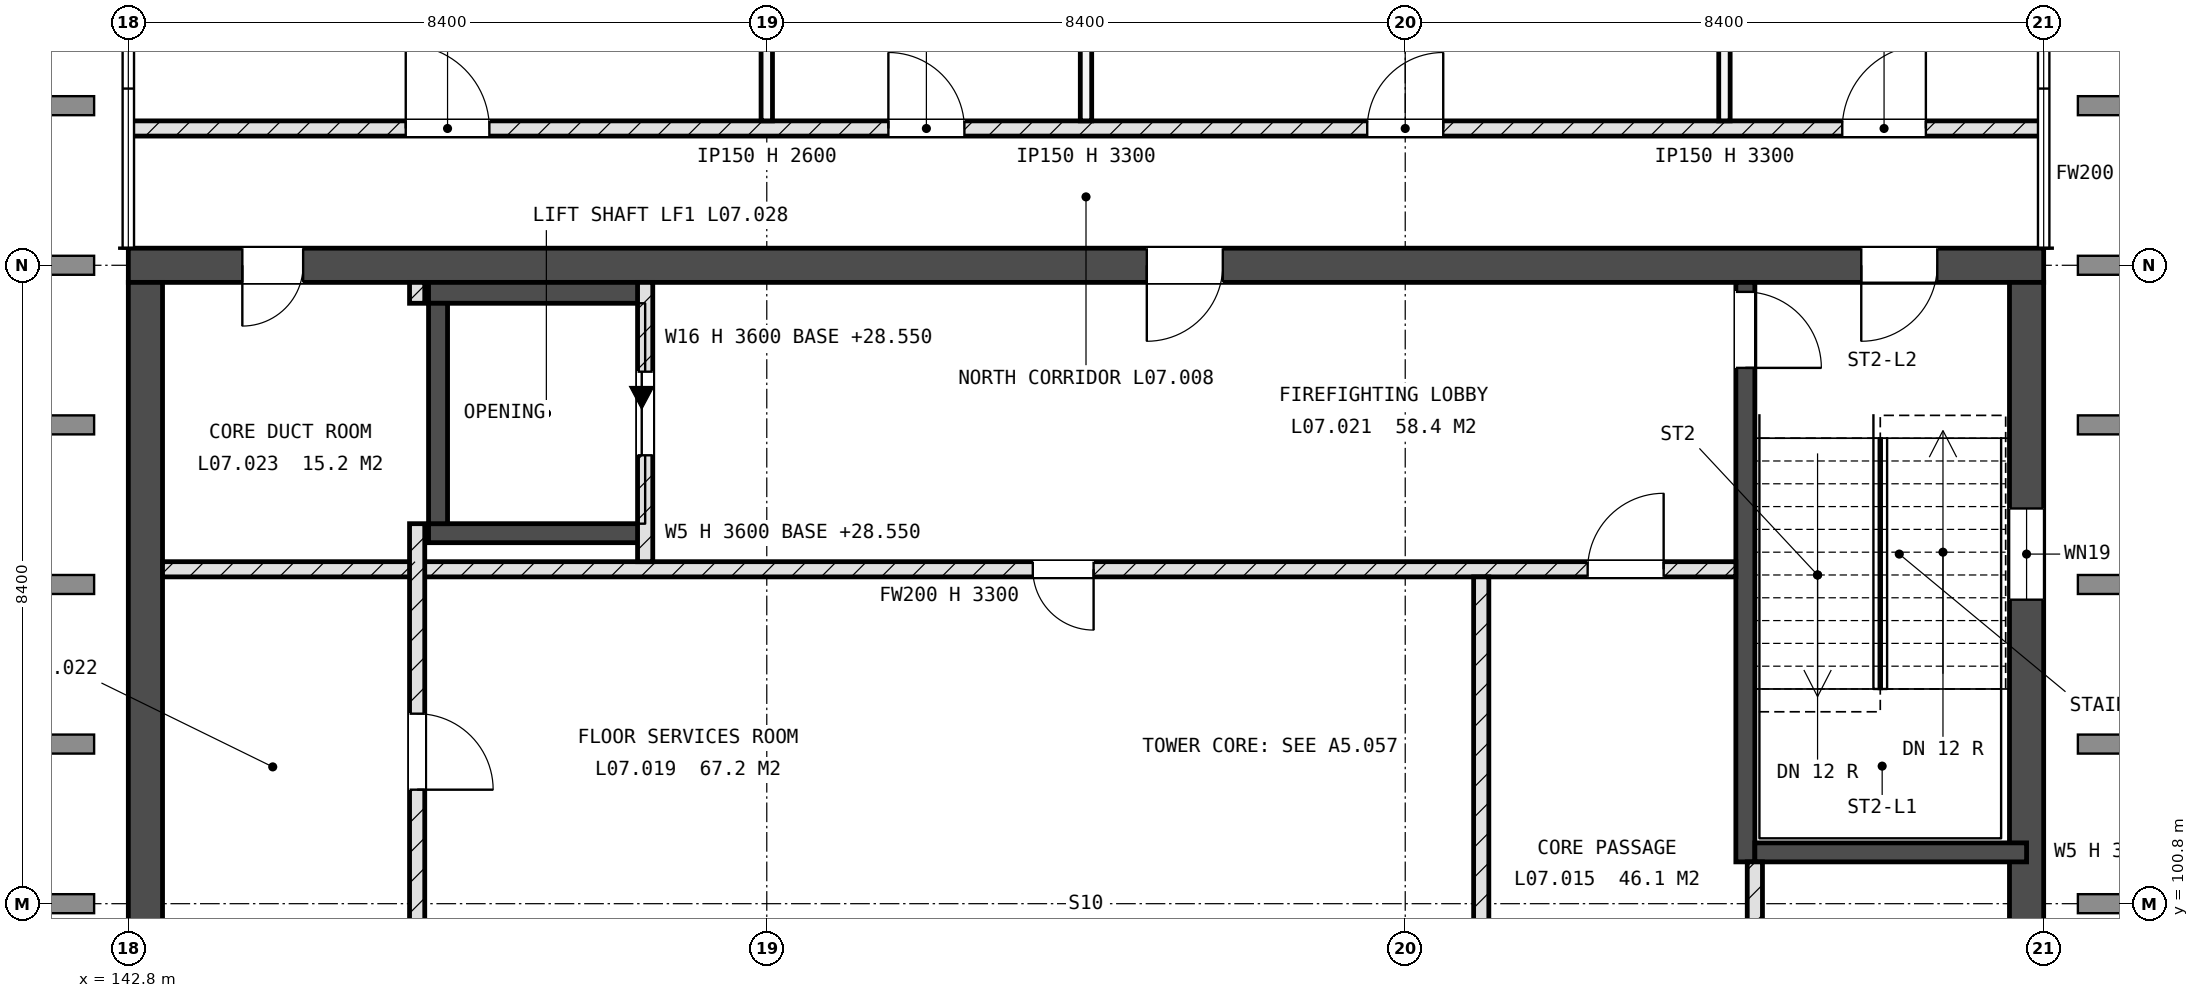
"""IFC4 building model, lengths in metres.
Left out: names, types, materials, properties, quantities, classifications, styles, units other than length and angle.
Written with IfcOpenShell. Run it as: python <this file> out.ifc"""

import sys

from ifc_helpers import new_model, si_unit, direction, frame, frame_2d, origin, place, context, subcontext, project, spatial, rectangle, extrude, element, fill, save


model = new_model("IFC4")
c1 = context("Model", 3, precision=1e-05, world=origin(), true_north=direction((0.0, 1.0)))
c2 = subcontext(c1, "Body", "Model", "MODEL_VIEW")
j1 = project(units=[si_unit("LENGTHUNIT", "METRE"), si_unit("PLANEANGLEUNIT", "RADIAN")], contexts=[c1])
p1 = place(None, origin())
s1 = spatial("IfcSite", under=j1, at=p1, CompositionType="ELEMENT")
p2 = place(p1, origin())
s2 = spatial("IfcBuilding", under=s1, at=p2, CompositionType="ELEMENT")
p3 = place(p2, frame((0.0, 0.0, 28.8)))
s3 = spatial("IfcBuildingStorey", under=s2, at=p3, CompositionType="ELEMENT", Elevation=28.8)
p4 = place(p3, frame((142.8, 109.2, -0.25), z_axis=(0.0, 0.0, 1.0), x_axis=(1.0, 0.0, 0.0)))
e1 = element("IfcWall", 1, at=p4, inside=s3, PredefinedType="SHEAR", context=c2, shape_type="SweptSolid", body=[
    extrude(rectangle(XDim=25.2, YDim=0.45, at=frame_2d((12.6, 0.0))), origin(), (0.0, 0.0, 1.0), 3.6),
])
p5 = place(p4, frame((22.8, 0.0, 0.25)))
e2 = element("IfcOpeningElement", 2, at=p5, cuts=e1, PredefinedType="OPENING", context=c2, shape_type="SweptSolid", body=[
    extrude(rectangle(XDim=1.0, YDim=2.1, at=frame_2d((0.5, 1.05))), frame((0.0, 0.235, 0.0), z_axis=(0.0, -1.0, 0.0), x_axis=(1.0, 0.0, 0.0)), (0.0, 0.0, 1.0), 0.47),
])
p6 = place(p4, frame((1.5, 0.0, 0.25)))
e3 = element("IfcOpeningElement", 3, at=p6, cuts=e1, PredefinedType="OPENING", context=c2, shape_type="SweptSolid", body=[
    extrude(rectangle(XDim=0.8, YDim=2.1, at=frame_2d((0.4, 1.05))), frame((0.0, 0.235, 0.0), z_axis=(0.0, -1.0, 0.0), x_axis=(1.0, 0.0, 0.0)), (0.0, 0.0, 1.0), 0.47),
])
p7 = place(p4, frame((13.4, 0.0, 0.25)))
e4 = element("IfcOpeningElement", 4, at=p7, cuts=e1, PredefinedType="OPENING", context=c2, shape_type="SweptSolid", body=[
    extrude(rectangle(XDim=1.0, YDim=2.1, at=frame_2d((0.5, 1.05))), frame((0.0, 0.235, 0.0), z_axis=(0.0, -1.0, 0.0), x_axis=(1.0, 0.0, 0.0)), (0.0, 0.0, 1.0), 0.47),
])
p8 = place(p3, frame((143.025, 92.625, -0.25), z_axis=(0.0, 0.0, 1.0), x_axis=(0.0, 1.0, 0.0)))
e5 = element("IfcWall", 5, at=p8, inside=s3, PredefinedType="SHEAR", context=c2, shape_type="SweptSolid", body=[
    extrude(rectangle(XDim=16.35, YDim=0.45, at=frame_2d((8.175, 0.0))), origin(), (0.0, 0.0, 1.0), 3.6),
])
p9 = place(p8, frame((2.975, 0.0, 1.85)))
e6 = element("IfcOpeningElement", 6, at=p9, cuts=e5, PredefinedType="OPENING", context=c2, shape_type="SweptSolid", body=[
    extrude(rectangle(XDim=1.2, YDim=0.9, at=frame_2d((0.6, 0.45))), frame((0.0, 0.235, 0.0), z_axis=(0.0, -1.0, 0.0), x_axis=(1.0, 0.0, 0.0)), (0.0, 0.0, 1.0), 0.47),
])
p10 = place(p3, frame((167.775, 92.625, -0.25), z_axis=(0.0, 0.0, 1.0), x_axis=(0.0, 1.0, 0.0)))
e7 = element("IfcWall", 7, at=p10, inside=s3, PredefinedType="SHEAR", context=c2, shape_type="SweptSolid", body=[
    extrude(rectangle(XDim=16.35, YDim=0.45, at=frame_2d((8.175, 0.0))), origin(), (0.0, 0.0, 1.0), 3.6),
])
p11 = place(p10, frame((12.175, 0.0, 1.85)))
e8 = element("IfcOpeningElement", 8, at=p11, cuts=e7, PredefinedType="OPENING", context=c2, shape_type="SweptSolid", body=[
    extrude(rectangle(XDim=1.2, YDim=0.9, at=frame_2d((0.6, 0.45))), frame((0.0, 0.235, 0.0), z_axis=(0.0, -1.0, 0.0), x_axis=(1.0, 0.0, 0.0)), (0.0, 0.0, 1.0), 0.47),
])
p12 = place(p3, frame((164.075, 101.35, -0.25), z_axis=(0.0, 0.0, 1.0), x_axis=(0.0, 1.0, 0.0)))
e9 = element("IfcWall", 9, at=p12, inside=s3, PredefinedType="SHEAR", context=c2, shape_type="SweptSolid", body=[
    extrude(rectangle(XDim=7.625, YDim=0.25, at=frame_2d((3.812, 0.0))), origin(), (0.0, 0.0, 1.0), 3.6),
])
p13 = place(p12, frame((6.5, 0.0, 0.25)))
e10 = element("IfcOpeningElement", 10, at=p13, cuts=e9, PredefinedType="OPENING", context=c2, shape_type="SweptSolid", body=[
    extrude(rectangle(XDim=1.0, YDim=2.1, at=frame_2d((0.5, 1.05))), frame((0.0, 0.135, 0.0), z_axis=(0.0, -1.0, 0.0), x_axis=(1.0, 0.0, 0.0)), (0.0, 0.0, 1.0), 0.27),
])
p14 = place(p3, frame((164.2, 101.475, -0.25), z_axis=(0.0, 0.0, 1.0), x_axis=(1.0, 0.0, 0.0)))
e11 = element("IfcWall", 11, at=p14, inside=s3, PredefinedType="SHEAR", context=c2, shape_type="SweptSolid", body=[
    extrude(rectangle(XDim=3.575, YDim=0.25, at=frame_2d((1.788, 0.0))), origin(), (0.0, 0.0, 1.0), 3.6),
])
p15 = place(p3, frame((146.75, 105.675, -0.25), z_axis=(0.0, 0.0, 1.0), x_axis=(1.0, 0.0, 0.0)))
e12 = element("IfcWall", 12, at=p15, inside=s3, PredefinedType="SHEAR", context=c2, shape_type="SweptSolid", body=[
    extrude(rectangle(XDim=2.85, YDim=0.25, at=frame_2d((1.425, 0.0))), origin(), (0.0, 0.0, 1.0), 3.6),
])
p16 = place(p3, frame((146.75, 108.837, -0.25), z_axis=(0.0, 0.0, 1.0), x_axis=(1.0, 0.0, 0.0)))
e13 = element("IfcWall", 13, at=p16, inside=s3, PredefinedType="SHEAR", context=c2, shape_type="SweptSolid", body=[
    extrude(rectangle(XDim=2.85, YDim=0.275, at=frame_2d((1.425, 0.0))), origin(), (0.0, 0.0, 1.0), 3.6),
])
p17 = place(p3, frame((146.875, 105.8, -0.25), z_axis=(0.0, 0.0, 1.0), x_axis=(0.0, 1.0, 0.0)))
e14 = element("IfcWall", 14, at=p17, inside=s3, PredefinedType="SHEAR", context=c2, shape_type="SweptSolid", body=[
    extrude(rectangle(XDim=2.9, YDim=0.25, at=frame_2d((1.45, 0.0))), origin(), (0.0, 0.0, 1.0), 3.6),
])
p18 = place(p3, frame((143.25, 105.2, 0.0), z_axis=(0.0, 0.0, 1.0), x_axis=(1.0, 0.0, 0.0)))
e15 = element("IfcWall", 15, at=p18, inside=s3, PredefinedType="SOLIDWALL", context=c2, shape_type="SweptSolid", body=[
    extrude(rectangle(XDim=20.7, YDim=0.2, at=frame_2d((10.35, 0.0))), origin(), (0.0, 0.0, 1.0), 3.3),
])
p19 = place(p18, frame((11.45, 0.0, 0.0)))
e16 = element("IfcOpeningElement", 16, at=p19, cuts=e15, PredefinedType="OPENING", context=c2, shape_type="SweptSolid", body=[
    extrude(rectangle(XDim=0.8, YDim=2.1, at=frame_2d((0.4, 1.05))), frame((0.0, 0.11, 0.0), z_axis=(0.0, -1.0, 0.0), x_axis=(1.0, 0.0, 0.0)), (0.0, 0.0, 1.0), 0.22),
])
p20 = place(p18, frame((18.75, 0.0, 0.0)))
e17 = element("IfcOpeningElement", 17, at=p20, cuts=e15, PredefinedType="OPENING", context=c2, shape_type="SweptSolid", body=[
    extrude(rectangle(XDim=1.0, YDim=2.1, at=frame_2d((0.5, 1.05))), frame((0.0, 0.11, 0.0), z_axis=(0.0, -1.0, 0.0), x_axis=(1.0, 0.0, 0.0)), (0.0, 0.0, 1.0), 0.22),
])
p21 = place(p3, frame((142.8, 111.0, 0.0), z_axis=(0.0, 0.0, 1.0), x_axis=(1.0, 0.0, 0.0)))
e18 = element("IfcWall", 18, at=p21, inside=s3, PredefinedType="SOLIDWALL", context=c2, shape_type="SweptSolid", body=[
    extrude(rectangle(XDim=25.2, YDim=0.2, at=frame_2d((12.6, 0.0))), origin(), (0.0, 0.0, 1.0), 3.3),
])
p22 = place(p21, frame((3.65, 0.0, 0.0)))
e19 = element("IfcOpeningElement", 19, at=p22, cuts=e18, PredefinedType="OPENING", context=c2, shape_type="SweptSolid", body=[
    extrude(rectangle(XDim=1.1, YDim=2.25, at=frame_2d((0.55, 1.125))), frame((0.0, 0.11, 0.0), z_axis=(0.0, -1.0, 0.0), x_axis=(1.0, 0.0, 0.0)), (0.0, 0.0, 1.0), 0.22),
])
p23 = place(p21, frame((10.0, 0.0, 0.0)))
e20 = element("IfcOpeningElement", 20, at=p23, cuts=e18, PredefinedType="OPENING", context=c2, shape_type="SweptSolid", body=[
    extrude(rectangle(XDim=1.0, YDim=2.1, at=frame_2d((0.5, 1.05))), frame((0.0, 0.11, 0.0), z_axis=(0.0, -1.0, 0.0), x_axis=(1.0, 0.0, 0.0)), (0.0, 0.0, 1.0), 0.22),
])
p24 = place(p21, frame((16.3, 0.0, 0.0)))
e21 = element("IfcOpeningElement", 21, at=p24, cuts=e18, PredefinedType="OPENING", context=c2, shape_type="SweptSolid", body=[
    extrude(rectangle(XDim=1.0, YDim=2.1, at=frame_2d((0.5, 1.05))), frame((0.0, 0.11, 0.0), z_axis=(0.0, -1.0, 0.0), x_axis=(1.0, 0.0, 0.0)), (0.0, 0.0, 1.0), 0.22),
])
p25 = place(p21, frame((22.55, 0.0, 0.0)))
e22 = element("IfcOpeningElement", 22, at=p25, cuts=e18, PredefinedType="OPENING", context=c2, shape_type="SweptSolid", body=[
    extrude(rectangle(XDim=1.1, YDim=2.25, at=frame_2d((0.55, 1.125))), frame((0.0, 0.11, 0.0), z_axis=(0.0, -1.0, 0.0), x_axis=(1.0, 0.0, 0.0)), (0.0, 0.0, 1.0), 0.22),
])
p26 = place(p3, frame((146.6, 100.5, 0.0), z_axis=(0.0, 0.0, 1.0), x_axis=(0.0, 1.0, 0.0)))
e23 = element("IfcWall", 23, at=p26, inside=s3, PredefinedType="SOLIDWALL", context=c2, shape_type="SweptSolid", body=[
    extrude(rectangle(XDim=5.3, YDim=0.2, at=frame_2d((2.65, 0.0))), origin(), (0.0, 0.0, 1.0), 3.3),
])
p27 = place(p26, frame((1.8, 0.0, 0.0)))
e24 = element("IfcOpeningElement", 24, at=p27, cuts=e23, PredefinedType="OPENING", context=c2, shape_type="SweptSolid", body=[
    extrude(rectangle(XDim=1.0, YDim=2.1, at=frame_2d((0.5, 1.05))), frame((0.0, 0.11, 0.0), z_axis=(0.0, -1.0, 0.0), x_axis=(1.0, 0.0, 0.0)), (0.0, 0.0, 1.0), 0.22),
])
p28 = place(p3, frame((146.6, 108.7, 0.0), z_axis=(0.0, 0.0, 1.0), x_axis=(0.0, 1.0, 0.0)))
e25 = element("IfcWall", 25, at=p28, inside=s3, PredefinedType="SOLIDWALL", context=c2, shape_type="SweptSolid", body=[
    extrude(rectangle(XDim=0.275, YDim=0.2, at=frame_2d((0.138, 0.0))), origin(), (0.0, 0.0, 1.0), 3.3),
])
p29 = place(p3, frame((149.6, 105.3, 0.0), z_axis=(0.0, 0.0, 1.0), x_axis=(0.0, 1.0, 0.0)))
e26 = element("IfcWall", 26, at=p29, inside=s3, PredefinedType="SOLIDWALL", context=c2, shape_type="SweptSolid", body=[
    extrude(rectangle(XDim=3.675, YDim=0.2, at=frame_2d((1.837, 0.0))), origin(), (0.0, 0.0, 1.0), 3.3),
])
p30 = place(p29, frame((1.4, 0.0, 0.0)))
e27 = element("IfcOpeningElement", 27, at=p30, cuts=e26, PredefinedType="OPENING", context=c2, shape_type="SweptSolid", body=[
    extrude(rectangle(XDim=1.1, YDim=2.1, at=frame_2d((0.55, 1.05))), frame((0.0, 0.11, 0.0), z_axis=(0.0, -1.0, 0.0), x_axis=(1.0, 0.0, 0.0)), (0.0, 0.0, 1.0), 0.22),
])
p31 = place(p3, frame((151.2, 111.1, 0.0), z_axis=(0.0, 0.0, 1.0), x_axis=(0.0, 1.0, 0.0)))
e28 = element("IfcWall", 28, at=p31, inside=s3, PredefinedType="PARTITIONING", context=c2, shape_type="SweptSolid", body=[
    extrude(rectangle(XDim=6.5, YDim=0.15, at=frame_2d((3.25, 0.0))), origin(), (0.0, 0.0, 1.0), 2.6),
])
p32 = place(p3, frame((155.4, 111.1, 0.0), z_axis=(0.0, 0.0, 1.0), x_axis=(0.0, 1.0, 0.0)))
e29 = element("IfcWall", 29, at=p32, inside=s3, PredefinedType="PARTITIONING", context=c2, shape_type="SweptSolid", body=[
    extrude(rectangle(XDim=6.5, YDim=0.15, at=frame_2d((3.25, 0.0))), origin(), (0.0, 0.0, 1.0), 3.3),
])
p33 = place(p3, frame((160.6, 92.625, 0.0), z_axis=(0.0, 0.0, 1.0), x_axis=(0.0, 1.0, 0.0)))
e30 = element("IfcWall", 30, at=p33, inside=s3, PredefinedType="SOLIDWALL", context=c2, shape_type="SweptSolid", body=[
    extrude(rectangle(XDim=12.475, YDim=0.2, at=frame_2d((6.238, 0.0))), origin(), (0.0, 0.0, 1.0), 3.3),
])
p34 = place(p33, frame((5.075, 0.0, 0.0)))
e31 = element("IfcOpeningElement", 31, at=p34, cuts=e30, PredefinedType="OPENING", context=c2, shape_type="SweptSolid", body=[
    extrude(rectangle(XDim=0.8, YDim=2.1, at=frame_2d((0.4, 1.05))), frame((0.0, 0.11, 0.0), z_axis=(0.0, -1.0, 0.0), x_axis=(1.0, 0.0, 0.0)), (0.0, 0.0, 1.0), 0.22),
])
p35 = place(p33, frame((0.775, 0.0, 0.0)))
e32 = element("IfcOpeningElement", 32, at=p35, cuts=e30, PredefinedType="OPENING", context=c2, shape_type="SweptSolid", body=[
    extrude(rectangle(XDim=1.0, YDim=2.1, at=frame_2d((0.5, 1.05))), frame((0.0, 0.11, 0.0), z_axis=(0.0, -1.0, 0.0), x_axis=(1.0, 0.0, 0.0)), (0.0, 0.0, 1.0), 0.22),
])
p36 = place(p3, frame((163.8, 111.1, 0.0), z_axis=(0.0, 0.0, 1.0), x_axis=(0.0, 1.0, 0.0)))
e33 = element("IfcWall", 33, at=p36, inside=s3, PredefinedType="PARTITIONING", context=c2, shape_type="SweptSolid", body=[
    extrude(rectangle(XDim=6.5, YDim=0.15, at=frame_2d((3.25, 0.0))), origin(), (0.0, 0.0, 1.0), 3.3),
])
p37 = place(p3, frame((164.2, 92.625, 0.0), z_axis=(0.0, 0.0, 1.0), x_axis=(0.0, 1.0, 0.0)))
e34 = element("IfcWall", 34, at=p37, inside=s3, PredefinedType="SOLIDWALL", context=c2, shape_type="SweptSolid", body=[
    extrude(rectangle(XDim=8.725, YDim=0.2, at=frame_2d((4.363, 0.0))), origin(), (0.0, 0.0, 1.0), 3.3),
])
p38 = place(p37, frame((1.675, 0.0, 0.0)))
e35 = element("IfcOpeningElement", 35, at=p38, cuts=e34, PredefinedType="OPENING", context=c2, shape_type="SweptSolid", body=[
    extrude(rectangle(XDim=0.8, YDim=2.1, at=frame_2d((0.4, 1.05))), frame((0.0, 0.11, 0.0), z_axis=(0.0, -1.0, 0.0), x_axis=(1.0, 0.0, 0.0)), (0.0, 0.0, 1.0), 0.22),
])
p39 = place(p37, frame((6.275, 0.0, 0.0)))
e36 = element("IfcOpeningElement", 36, at=p39, cuts=e34, PredefinedType="OPENING", context=c2, shape_type="SweptSolid", body=[
    extrude(rectangle(XDim=0.8, YDim=2.1, at=frame_2d((0.4, 1.05))), frame((0.0, 0.11, 0.0), z_axis=(0.0, -1.0, 0.0), x_axis=(1.0, 0.0, 0.0)), (0.0, 0.0, 1.0), 0.22),
])
p40 = place(p11, origin())
e37 = element("IfcWindow", 37, at=p40, inside=s3, PartitioningType="SINGLE_PANEL", PredefinedType="WINDOW", context=c2, shape_type="SweptSolid", body=[
    extrude(rectangle(XDim=1.2, YDim=0.9, at=frame_2d((0.6, 0.45))), frame((0.0, 0.03, 0.0), z_axis=(0.0, -1.0, 0.0), x_axis=(1.0, 0.0, 0.0)), (0.0, 0.0, 1.0), 0.06),
])
fill(e8, e37)
p41 = place(p30, origin())
e38 = element("IfcDoor", 38, at=p41, inside=s3, OperationType="SLIDING_TO_LEFT", PredefinedType="DOOR", context=c2, shape_type="SweptSolid", body=[
    extrude(rectangle(XDim=1.1, YDim=2.1, at=frame_2d((0.55, 1.05))), frame((0.0, 0.025, 0.0), z_axis=(0.0, -1.0, 0.0), x_axis=(1.0, 0.0, 0.0)), (0.0, 0.0, 1.0), 0.05),
])
fill(e27, e38)
p42 = place(p13, origin())
e39 = element("IfcDoor", 39, at=p42, inside=s3, OperationType="SINGLE_SWING_LEFT", PredefinedType="DOOR", context=c2, shape_type="SweptSolid", body=[
    extrude(rectangle(XDim=1.0, YDim=2.1, at=frame_2d((0.5, 1.05))), frame((0.0, 0.025, 0.0), z_axis=(0.0, -1.0, 0.0), x_axis=(1.0, 0.0, 0.0)), (0.0, 0.0, 1.0), 0.05),
])
fill(e10, e39)
p43 = place(p5, origin())
e40 = element("IfcDoor", 40, at=p43, inside=s3, OperationType="SINGLE_SWING_LEFT", PredefinedType="DOOR", context=c2, shape_type="SweptSolid", body=[
    extrude(rectangle(XDim=1.0, YDim=2.1, at=frame_2d((0.5, 1.05))), frame((0.0, 0.025, 0.0), z_axis=(0.0, -1.0, 0.0), x_axis=(1.0, 0.0, 0.0)), (0.0, 0.0, 1.0), 0.05),
])
fill(e2, e40)
p44 = place(p22, origin())
e41 = element("IfcDoor", 41, at=p44, inside=s3, OperationType="SINGLE_SWING_RIGHT", PredefinedType="DOOR", context=c2, shape_type="SweptSolid", body=[
    extrude(rectangle(XDim=1.1, YDim=2.25, at=frame_2d((0.55, 1.125))), frame((0.0, 0.025, 0.0), z_axis=(0.0, -1.0, 0.0), x_axis=(1.0, 0.0, 0.0)), (0.0, 0.0, 1.0), 0.05),
])
fill(e19, e41)
p45 = place(p23, origin())
e42 = element("IfcDoor", 42, at=p45, inside=s3, OperationType="SINGLE_SWING_RIGHT", PredefinedType="DOOR", context=c2, shape_type="SweptSolid", body=[
    extrude(rectangle(XDim=1.0, YDim=2.1, at=frame_2d((0.5, 1.05))), frame((0.0, 0.025, 0.0), z_axis=(0.0, -1.0, 0.0), x_axis=(1.0, 0.0, 0.0)), (0.0, 0.0, 1.0), 0.05),
])
fill(e20, e42)
p46 = place(p24, origin())
e43 = element("IfcDoor", 43, at=p46, inside=s3, OperationType="SINGLE_SWING_LEFT", PredefinedType="DOOR", context=c2, shape_type="SweptSolid", body=[
    extrude(rectangle(XDim=1.0, YDim=2.1, at=frame_2d((0.5, 1.05))), frame((0.0, 0.025, 0.0), z_axis=(0.0, -1.0, 0.0), x_axis=(1.0, 0.0, 0.0)), (0.0, 0.0, 1.0), 0.05),
])
fill(e21, e43)
p47 = place(p25, origin())
e44 = element("IfcDoor", 44, at=p47, inside=s3, OperationType="SINGLE_SWING_LEFT", PredefinedType="DOOR", context=c2, shape_type="SweptSolid", body=[
    extrude(rectangle(XDim=1.1, YDim=2.25, at=frame_2d((0.55, 1.125))), frame((0.0, 0.025, 0.0), z_axis=(0.0, -1.0, 0.0), x_axis=(1.0, 0.0, 0.0)), (0.0, 0.0, 1.0), 0.05),
])
fill(e22, e44)
p48 = place(p19, origin())
e45 = element("IfcDoor", 45, at=p48, inside=s3, OperationType="SINGLE_SWING_RIGHT", PredefinedType="DOOR", context=c2, shape_type="SweptSolid", body=[
    extrude(rectangle(XDim=0.8, YDim=2.1, at=frame_2d((0.4, 1.05))), frame((0.0, 0.025, 0.0), z_axis=(0.0, -1.0, 0.0), x_axis=(1.0, 0.0, 0.0)), (0.0, 0.0, 1.0), 0.05),
])
fill(e16, e45)
p49 = place(p27, origin())
e46 = element("IfcDoor", 46, at=p49, inside=s3, OperationType="SINGLE_SWING_LEFT", PredefinedType="DOOR", context=c2, shape_type="SweptSolid", body=[
    extrude(rectangle(XDim=1.0, YDim=2.1, at=frame_2d((0.5, 1.05))), frame((0.0, 0.025, 0.0), z_axis=(0.0, -1.0, 0.0), x_axis=(1.0, 0.0, 0.0)), (0.0, 0.0, 1.0), 0.05),
])
fill(e24, e46)
p50 = place(p6, origin())
e47 = element("IfcDoor", 47, at=p50, inside=s3, OperationType="SINGLE_SWING_LEFT", PredefinedType="DOOR", context=c2, shape_type="SweptSolid", body=[
    extrude(rectangle(XDim=0.8, YDim=2.1, at=frame_2d((0.4, 1.05))), frame((0.0, 0.025, 0.0), z_axis=(0.0, -1.0, 0.0), x_axis=(1.0, 0.0, 0.0)), (0.0, 0.0, 1.0), 0.05),
])
fill(e3, e47)
p51 = place(p7, origin())
e48 = element("IfcDoor", 48, at=p51, inside=s3, OperationType="SINGLE_SWING_LEFT", PredefinedType="DOOR", context=c2, shape_type="SweptSolid", body=[
    extrude(rectangle(XDim=1.0, YDim=2.1, at=frame_2d((0.5, 1.05))), frame((0.0, 0.025, 0.0), z_axis=(0.0, -1.0, 0.0), x_axis=(1.0, 0.0, 0.0)), (0.0, 0.0, 1.0), 0.05),
])
fill(e4, e48)
p52 = place(p20, origin())
e49 = element("IfcDoor", 49, at=p52, inside=s3, OperationType="SINGLE_SWING_LEFT", PredefinedType="DOOR", context=c2, shape_type="SweptSolid", body=[
    extrude(rectangle(XDim=1.0, YDim=2.1, at=frame_2d((0.5, 1.05))), frame((0.0, 0.025, 0.0), z_axis=(0.0, -1.0, 0.0), x_axis=(1.0, 0.0, 0.0)), (0.0, 0.0, 1.0), 0.05),
])
fill(e17, e49)
save(model, sys.argv[1])
